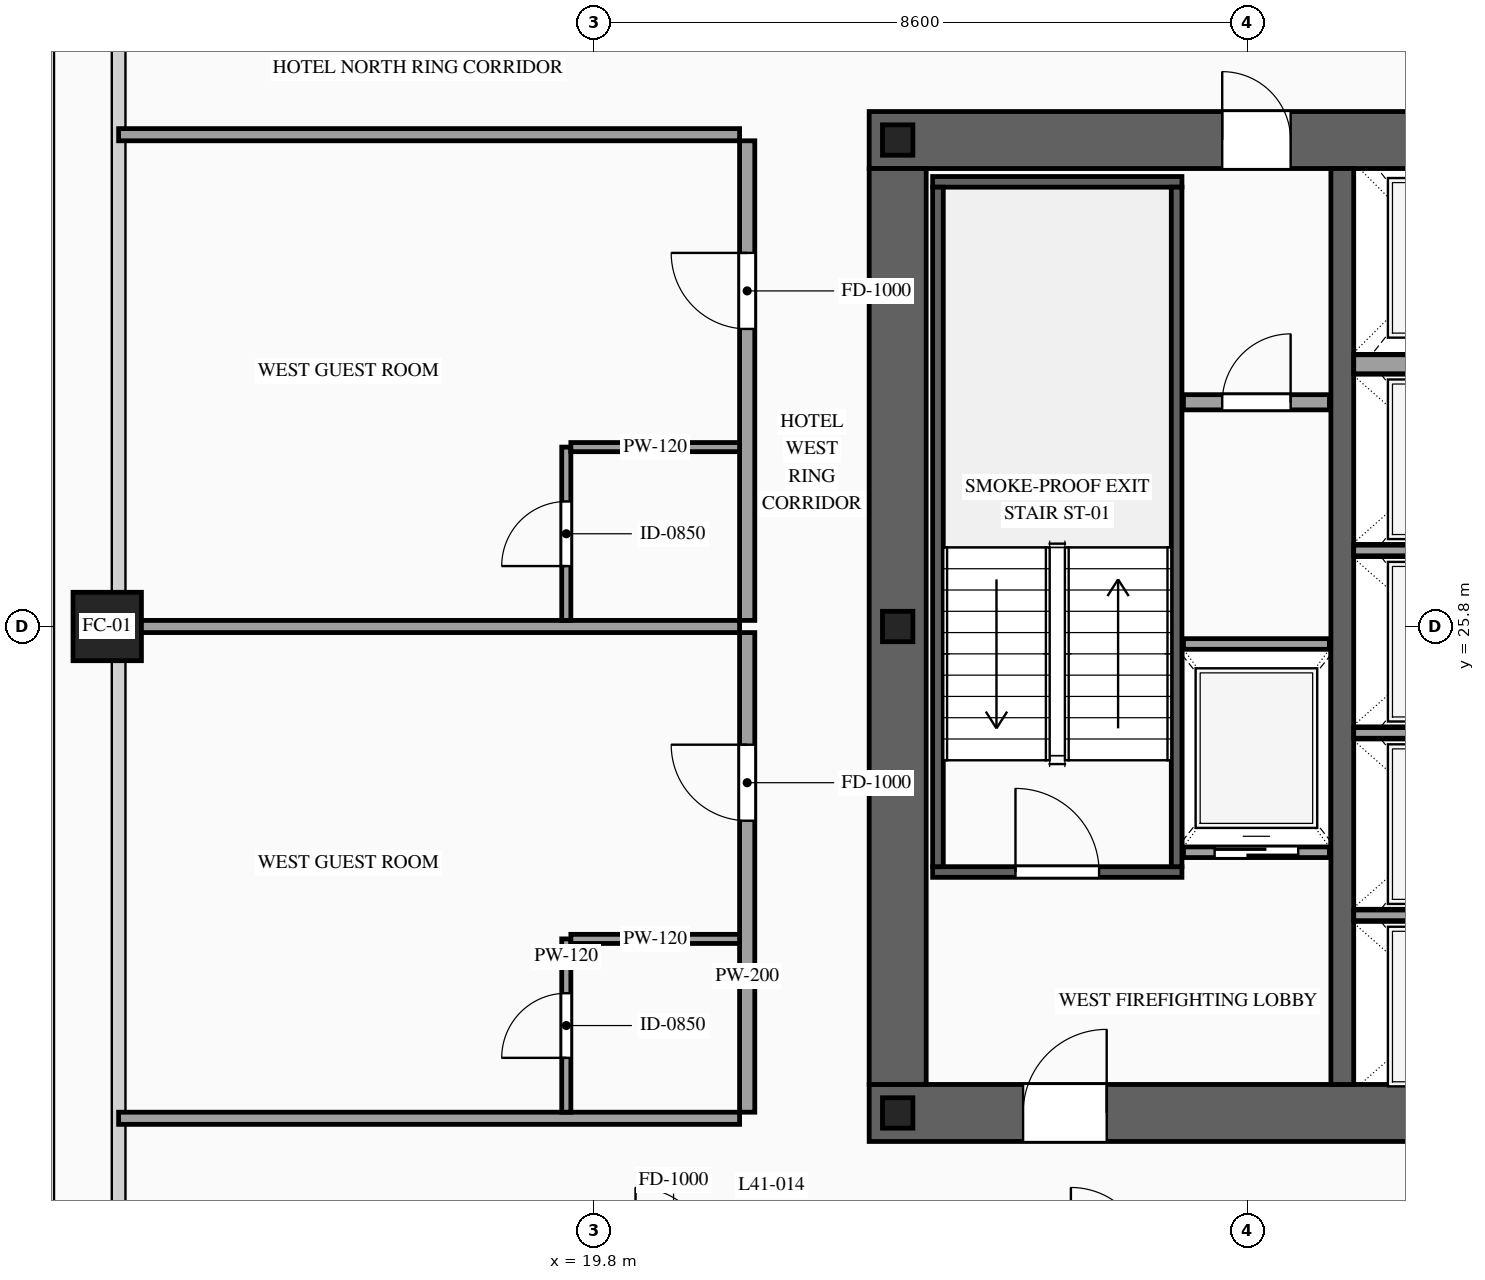
"""IFC4 building model, lengths in metres.
Left out: names, types, materials, properties, quantities, classifications, styles, units other than length and angle.
Written with IfcOpenShell. Run it as: python <this file> out.ifc"""

import sys

from ifc_helpers import new_model, si_unit, direction, frame, frame_2d, origin, origin_2d, place, context, subcontext, project, spatial, rectangle, hollow_rectangle, i_section, extrude, source, transform, mapped, element, fill, save


model = new_model("IFC4")
c1 = context("Model", 3, precision=1e-05, world=origin(), true_north=direction((0.0, 1.0)))
c2 = subcontext(c1, "Body", "Model", "MODEL_VIEW")
j1 = project(units=[si_unit("LENGTHUNIT", "METRE"), si_unit("PLANEANGLEUNIT", "RADIAN")], contexts=[c1])
p1 = place(None, origin())
s1 = spatial("IfcSite", under=j1, at=p1, CompositionType="ELEMENT")
p2 = place(p1, origin())
s2 = spatial("IfcBuilding", under=s1, at=p2, CompositionType="ELEMENT")
p3 = place(p2, frame((0.0, 0.0, 156.0)))
s3 = spatial("IfcBuildingStorey", under=s2, at=p3, CompositionType="ELEMENT", Elevation=156.0)
p4 = place(p3, frame((23.425, 19.4, 0.0), z_axis=(0.0, 0.0, 1.0), x_axis=(1.0, 0.0, 0.0)))
e1 = element("IfcWall", 1, at=p4, inside=s3, PredefinedType="SHEAR", context=c2, shape_type="SweptSolid", body=[
    extrude(rectangle(XDim=27.15, YDim=0.75, at=frame_2d((13.575, 0.0))), origin(), (0.0, 0.0, 1.0), 3.6),
])
p5 = place(p4, frame((2.025, 0.0, 0.0)))
e2 = element("IfcOpeningElement", 2, at=p5, cuts=e1, PredefinedType="OPENING", context=c2, shape_type="SweptSolid", body=[
    extrude(rectangle(XDim=1.1, YDim=2.2, at=frame_2d((0.55, 1.1))), frame((0.0, 0.39, 0.0), z_axis=(0.0, -1.0, 0.0), x_axis=(1.0, 0.0, 0.0)), (0.0, 0.0, 1.0), 0.78),
])
p6 = place(p4, frame((9.925, 0.0, 0.0)))
e3 = element("IfcOpeningElement", 3, at=p6, cuts=e1, PredefinedType="OPENING", context=c2, shape_type="SweptSolid", body=[
    extrude(rectangle(XDim=1.1, YDim=2.2, at=frame_2d((0.55, 1.1))), frame((0.0, 0.39, 0.0), z_axis=(0.0, -1.0, 0.0), x_axis=(1.0, 0.0, 0.0)), (0.0, 0.0, 1.0), 0.78),
])
p7 = place(p4, frame((23.125, 0.0, 0.0)))
e4 = element("IfcOpeningElement", 4, at=p7, cuts=e1, PredefinedType="OPENING", context=c2, shape_type="SweptSolid", body=[
    extrude(rectangle(XDim=1.1, YDim=2.2, at=frame_2d((0.55, 1.1))), frame((0.0, 0.39, 0.0), z_axis=(0.0, -1.0, 0.0), x_axis=(1.0, 0.0, 0.0)), (0.0, 0.0, 1.0), 0.78),
])
p8 = place(p4, frame((19.745, 0.0, 0.0)))
e5 = element("IfcOpeningElement", 5, at=p8, cuts=e1, PredefinedType="OPENING", context=c2, shape_type="SweptSolid", body=[
    extrude(rectangle(XDim=0.9, YDim=2.15, at=frame_2d((0.45, 1.075))), frame((0.0, 0.39, 0.0), z_axis=(0.0, -1.0, 0.0), x_axis=(1.0, 0.0, 0.0)), (0.0, 0.0, 1.0), 0.78),
])
p9 = place(p4, frame((18.305, 0.0, 0.0)))
e6 = element("IfcOpeningElement", 6, at=p9, cuts=e1, PredefinedType="OPENING", context=c2, shape_type="SweptSolid", body=[
    extrude(rectangle(XDim=0.9, YDim=2.15, at=frame_2d((0.45, 1.075))), frame((0.0, 0.39, 0.0), z_axis=(0.0, -1.0, 0.0), x_axis=(1.0, 0.0, 0.0)), (0.0, 0.0, 1.0), 0.78),
])
p10 = place(p3, frame((23.425, 32.2, 0.0), z_axis=(0.0, 0.0, 1.0), x_axis=(1.0, 0.0, 0.0)))
e7 = element("IfcWall", 7, at=p10, inside=s3, PredefinedType="SHEAR", context=c2, shape_type="SweptSolid", body=[
    extrude(rectangle(XDim=27.15, YDim=0.75, at=frame_2d((13.575, 0.0))), origin(), (0.0, 0.0, 1.0), 3.6),
])
p11 = place(p10, frame((4.645, 0.0, 0.0)))
e8 = element("IfcOpeningElement", 8, at=p11, cuts=e7, PredefinedType="OPENING", context=c2, shape_type="SweptSolid", body=[
    extrude(rectangle(XDim=0.9, YDim=2.15, at=frame_2d((0.45, 1.075))), frame((0.0, 0.39, 0.0), z_axis=(0.0, -1.0, 0.0), x_axis=(1.0, 0.0, 0.0)), (0.0, 0.0, 1.0), 0.78),
])
p12 = place(p10, frame((9.925, 0.0, 0.0)))
e9 = element("IfcOpeningElement", 9, at=p12, cuts=e7, PredefinedType="OPENING", context=c2, shape_type="SweptSolid", body=[
    extrude(rectangle(XDim=1.1, YDim=2.2, at=frame_2d((0.55, 1.1))), frame((0.0, 0.39, 0.0), z_axis=(0.0, -1.0, 0.0), x_axis=(1.0, 0.0, 0.0)), (0.0, 0.0, 1.0), 0.78),
])
p13 = place(p10, frame((15.775, 0.0, 0.0)))
e10 = element("IfcOpeningElement", 10, at=p13, cuts=e7, PredefinedType="OPENING", context=c2, shape_type="SweptSolid", body=[
    extrude(rectangle(XDim=1.1, YDim=2.2, at=frame_2d((0.55, 1.1))), frame((0.0, 0.39, 0.0), z_axis=(0.0, -1.0, 0.0), x_axis=(1.0, 0.0, 0.0)), (0.0, 0.0, 1.0), 0.78),
])
p14 = place(p10, frame((18.305, 0.0, 0.0)))
e11 = element("IfcOpeningElement", 11, at=p14, cuts=e7, PredefinedType="OPENING", context=c2, shape_type="SweptSolid", body=[
    extrude(rectangle(XDim=0.9, YDim=2.15, at=frame_2d((0.45, 1.075))), frame((0.0, 0.39, 0.0), z_axis=(0.0, -1.0, 0.0), x_axis=(1.0, 0.0, 0.0)), (0.0, 0.0, 1.0), 0.78),
])
p15 = place(p10, frame((19.745, 0.0, 0.0)))
e12 = element("IfcOpeningElement", 12, at=p15, cuts=e7, PredefinedType="OPENING", context=c2, shape_type="SweptSolid", body=[
    extrude(rectangle(XDim=0.9, YDim=2.15, at=frame_2d((0.45, 1.075))), frame((0.0, 0.39, 0.0), z_axis=(0.0, -1.0, 0.0), x_axis=(1.0, 0.0, 0.0)), (0.0, 0.0, 1.0), 0.78),
])
m1 = source(origin(), c2, "Body", "SweptSolid", [
    extrude(rectangle(XDim=12.05, YDim=0.75, at=frame_2d((6.025, 0.0))), origin(), (0.0, 0.0, 1.0), 3.6),
])
p16 = place(p3, frame((23.8, 19.775, 0.0), z_axis=(0.0, 0.0, 1.0), x_axis=(0.0, 1.0, 0.0)))
e13 = element("IfcWall", 13, at=p16, inside=s3, PredefinedType="SHEAR", context=c2, shape_type="MappedRepresentation", body=[
    mapped(m1, transform((0.0, 0.0, 0.0), scale=1.0)),
])
m2 = source(origin(), c2, "Body", "SweptSolid", [
    extrude(rectangle(XDim=12.05, YDim=0.3, at=frame_2d((6.025, 0.0))), origin(), (0.0, 0.0, 1.0), 3.6),
])
p17 = place(p3, frame((29.65, 19.775, 0.0), z_axis=(0.0, 0.0, 1.0), x_axis=(0.0, 1.0, 0.0)))
e14 = element("IfcWall", 14, at=p17, inside=s3, PredefinedType="SOLIDWALL", context=c2, shape_type="MappedRepresentation", body=[
    mapped(m2, transform((0.0, 0.0, 0.0), scale=1.0)),
])
m3 = source(origin(), c2, "Body", "SweptSolid", [
    extrude(i_section(OverallWidth=0.4, OverallDepth=0.4, WebThickness=0.013, FlangeThickness=0.021, at=origin_2d()), origin(), (0.0, 0.0, 1.0), 3.6),
])
for number, where, z_axis, x_axis in (
    (15, (23.8, 19.4, 0.0), (0.0, 0.0, 1.0), (1.0, 0.0, 0.0)),
    (16, (23.8, 25.8, 0.0), (0.0, 0.0, 1.0), (1.0, 0.0, 0.0)),
    (17, (23.8, 32.2, 0.0), (0.0, 0.0, 1.0), (1.0, 0.0, 0.0)),
):
    element("IfcColumn", number, at=place(p3, frame(where, z_axis=z_axis, x_axis=x_axis)), inside=s3, PredefinedType="COLUMN", context=c2, shape_type="MappedRepresentation", body=[
        mapped(m3, transform((0.0, 0.0, 0.0), scale=1.0)),
    ])
m4 = source(origin(), c2, "Body", "SweptSolid", [
    extrude(hollow_rectangle(XDim=0.9, YDim=0.9, WallThickness=0.042, at=origin_2d()), origin(), (0.0, 0.0, 1.0), 3.6),
])
p18 = place(p3, frame((13.4, 25.8, 0.0), z_axis=(0.0, 0.0, 1.0), x_axis=(1.0, 0.0, 0.0)))
e18 = element("IfcColumn", 18, at=p18, inside=s3, PredefinedType="COLUMN", context=c2, shape_type="MappedRepresentation", body=[
    mapped(m4, transform((0.0, 0.0, 0.0), scale=1.0)),
])
p19 = place(p3, frame((27.56, 22.83, 0.0), z_axis=(0.0, 0.0, 1.0), x_axis=(1.0, 0.0, 0.0)))
e19 = element("IfcWall", 19, at=p19, inside=s3, PredefinedType="SOLIDWALL", context=c2, shape_type="SweptSolid", body=[
    extrude(rectangle(XDim=1.92, YDim=0.14, at=frame_2d((0.96, 0.0))), origin(), (0.0, 0.0, 1.0), 3.38),
])
p20 = place(p19, frame((0.41, 0.0, 0.0)))
e20 = element("IfcOpeningElement", 20, at=p20, cuts=e19, PredefinedType="OPENING", context=c2, shape_type="SweptSolid", body=[
    extrude(rectangle(XDim=1.1, YDim=2.2, at=frame_2d((0.55, 1.1))), frame((0.0, 0.085, 0.0), z_axis=(0.0, -1.0, 0.0), x_axis=(1.0, 0.0, 0.0)), (0.0, 0.0, 1.0), 0.17),
])
m5 = source(origin(), c2, "Body", "SweptSolid", [
    extrude(rectangle(XDim=1.92, YDim=0.14, at=frame_2d((0.96, 0.0))), origin(), (0.0, 0.0, 1.0), 3.38),
])
p21 = place(p3, frame((27.56, 25.57, 0.0), z_axis=(0.0, 0.0, 1.0), x_axis=(1.0, 0.0, 0.0)))
e21 = element("IfcWall", 21, at=p21, inside=s3, PredefinedType="SOLIDWALL", context=c2, shape_type="MappedRepresentation", body=[
    mapped(m5, transform((0.0, 0.0, 0.0), scale=1.0)),
])
m6 = source(origin(), c2, "Body", "SweptSolid", [
    extrude(rectangle(XDim=2.5, YDim=0.14, at=frame_2d((1.25, 0.0))), origin(), (0.0, 0.0, 1.0), 3.38),
])
for number, where, z_axis, x_axis in (
    (22, (29.8, 22.0, 0.0), (0.0, 0.0, 1.0), (1.0, 0.0, 0.0)),
    (23, (29.8, 24.4, 0.0), (0.0, 0.0, 1.0), (1.0, 0.0, 0.0)),
    (24, (29.8, 26.8, 0.0), (0.0, 0.0, 1.0), (1.0, 0.0, 0.0)),
):
    element("IfcWall", number, at=place(p3, frame(where, z_axis=z_axis, x_axis=x_axis)), inside=s3, PredefinedType="SOLIDWALL", context=c2, shape_type="MappedRepresentation", body=[
        mapped(m6, transform((0.0, 0.0, 0.0), scale=1.0)),
    ])
m7 = source(origin(), c2, "Body", "SweptSolid", [
    extrude(rectangle(XDim=2.5, YDim=0.25, at=frame_2d((1.25, 0.0))), origin(), (0.0, 0.0, 1.0), 3.38),
])
p22 = place(p3, frame((29.8, 29.25, 0.0), z_axis=(0.0, 0.0, 1.0), x_axis=(1.0, 0.0, 0.0)))
e25 = element("IfcWall", 25, at=p22, inside=s3, PredefinedType="SOLIDWALL", context=c2, shape_type="MappedRepresentation", body=[
    mapped(m7, transform((0.0, 0.0, 0.0), scale=1.0)),
])
p23 = place(p3, frame((24.26, 22.57, 0.0), z_axis=(0.0, 0.0, 1.0), x_axis=(1.0, 0.0, 0.0)))
e26 = element("IfcWall", 26, at=p23, inside=s3, PredefinedType="SOLIDWALL", context=c2, shape_type="SweptSolid", body=[
    extrude(rectangle(XDim=3.28, YDim=0.14, at=frame_2d((1.64, 0.0))), origin(), (0.0, 0.0, 1.0), 3.38),
])
p24 = place(p23, frame((1.09, 0.0, 0.0)))
e27 = element("IfcOpeningElement", 27, at=p24, cuts=e26, PredefinedType="OPENING", context=c2, shape_type="SweptSolid", body=[
    extrude(rectangle(XDim=1.1, YDim=2.2, at=frame_2d((0.55, 1.1))), frame((0.0, 0.085, 0.0), z_axis=(0.0, -1.0, 0.0), x_axis=(1.0, 0.0, 0.0)), (0.0, 0.0, 1.0), 0.17),
])
m8 = source(origin(), c2, "Body", "SweptSolid", [
    extrude(rectangle(XDim=3.28, YDim=0.14, at=frame_2d((1.64, 0.0))), origin(), (0.0, 0.0, 1.0), 3.38),
])
p25 = place(p3, frame((24.26, 31.65, 0.0), z_axis=(0.0, 0.0, 1.0), x_axis=(1.0, 0.0, 0.0)))
e28 = element("IfcWall", 28, at=p25, inside=s3, PredefinedType="SOLIDWALL", context=c2, shape_type="MappedRepresentation", body=[
    mapped(m8, transform((0.0, 0.0, 0.0), scale=1.0)),
])
m9 = source(origin(), c2, "Body", "SweptSolid", [
    extrude(rectangle(XDim=8.94, YDim=0.14, at=frame_2d((4.47, 0.0))), origin(), (0.0, 0.0, 1.0), 3.38),
])
for number, where, z_axis, x_axis in (
    (29, (24.33, 22.64, 0.0), (0.0, 0.0, 1.0), (0.0, 1.0, 0.0)),
    (30, (27.47, 22.64, 0.0), (0.0, 0.0, 1.0), (0.0, 1.0, 0.0)),
):
    element("IfcWall", number, at=place(p3, frame(where, z_axis=z_axis, x_axis=x_axis)), inside=s3, PredefinedType="SOLIDWALL", context=c2, shape_type="MappedRepresentation", body=[
        mapped(m9, transform((0.0, 0.0, 0.0), scale=1.0)),
    ])
p26 = place(p3, frame((27.56, 28.75, 0.0), z_axis=(0.0, 0.0, 1.0), x_axis=(1.0, 0.0, 0.0)))
e31 = element("IfcWall", 31, at=p26, inside=s3, PredefinedType="PARTITIONING", context=c2, shape_type="SweptSolid", body=[
    extrude(rectangle(XDim=1.92, YDim=0.2, at=frame_2d((0.96, 0.0))), origin(), (0.0, 0.0, 1.0), 3.38),
])
p27 = place(p26, frame((0.51, 0.0, 0.0)))
e32 = element("IfcOpeningElement", 32, at=p27, cuts=e31, PredefinedType="OPENING", context=c2, shape_type="SweptSolid", body=[
    extrude(rectangle(XDim=0.9, YDim=2.15, at=frame_2d((0.45, 1.075))), frame((0.0, 0.115, 0.0), z_axis=(0.0, -1.0, 0.0), x_axis=(1.0, 0.0, 0.0)), (0.0, 0.0, 1.0), 0.23),
])
p28 = place(p3, frame((21.82, 19.41, 0.0), z_axis=(0.0, 0.0, 1.0), x_axis=(0.0, 1.0, 0.0)))
e33 = element("IfcWall", 33, at=p28, inside=s3, PredefinedType="PARTITIONING", context=c2, shape_type="SweptSolid", body=[
    extrude(rectangle(XDim=6.31, YDim=0.2, at=frame_2d((3.155, 0.0))), origin(), (0.0, 0.0, 1.0), 3.38),
])
p29 = place(p28, frame((3.835, 0.0, 0.0)))
e34 = element("IfcOpeningElement", 34, at=p29, cuts=e33, PredefinedType="OPENING", context=c2, shape_type="SweptSolid", body=[
    extrude(rectangle(XDim=1.0, YDim=2.2, at=frame_2d((0.5, 1.1))), frame((0.0, 0.115, 0.0), z_axis=(0.0, -1.0, 0.0), x_axis=(1.0, 0.0, 0.0)), (0.0, 0.0, 1.0), 0.23),
])
m10 = source(origin(), c2, "Body", "SweptSolid", [
    extrude(rectangle(XDim=8.17, YDim=0.16, at=frame_2d((4.085, 0.0))), origin(), (0.0, 0.0, 1.0), 2.675),
])
p30 = place(p3, frame((13.55, 25.8, 0.0), z_axis=(0.0, 0.0, 1.0), x_axis=(1.0, 0.0, 0.0)))
e35 = element("IfcWall", 35, at=p30, inside=s3, PredefinedType="PARTITIONING", context=c2, shape_type="MappedRepresentation", body=[
    mapped(m10, transform((0.0, 0.0, 0.0), scale=1.0)),
])
m11 = source(origin(), c2, "Body", "SweptSolid", [
    extrude(rectangle(XDim=8.17, YDim=0.16, at=frame_2d((4.085, 0.0))), origin(), (0.0, 0.0, 1.0), 2.875),
])
p31 = place(p3, frame((13.55, 19.33, 0.0), z_axis=(0.0, 0.0, 1.0), x_axis=(1.0, 0.0, 0.0)))
e36 = element("IfcWall", 36, at=p31, inside=s3, PredefinedType="PARTITIONING", context=c2, shape_type="MappedRepresentation", body=[
    mapped(m11, transform((0.0, 0.0, 0.0), scale=1.0)),
])
p32 = place(p3, frame((19.44, 19.41, 0.0), z_axis=(0.0, 0.0, 1.0), x_axis=(0.0, 1.0, 0.0)))
e37 = element("IfcWall", 37, at=p32, inside=s3, PredefinedType="PARTITIONING", context=c2, shape_type="SweptSolid", body=[
    extrude(rectangle(XDim=2.28, YDim=0.12, at=frame_2d((1.14, 0.0))), origin(), (0.0, 0.0, 1.0), 3.38),
])
p33 = place(p32, frame((0.715, 0.0, 0.0)))
e38 = element("IfcOpeningElement", 38, at=p33, cuts=e37, PredefinedType="OPENING", context=c2, shape_type="SweptSolid", body=[
    extrude(rectangle(XDim=0.85, YDim=2.1, at=frame_2d((0.425, 1.05))), frame((0.0, 0.075, 0.0), z_axis=(0.0, -1.0, 0.0), x_axis=(1.0, 0.0, 0.0)), (0.0, 0.0, 1.0), 0.15),
])
m12 = source(origin(), c2, "Body", "SweptSolid", [
    extrude(rectangle(XDim=2.22, YDim=0.12, at=frame_2d((1.11, 0.0))), origin(), (0.0, 0.0, 1.0), 3.38),
])
p34 = place(p3, frame((19.5, 21.69, 0.0), z_axis=(0.0, 0.0, 1.0), x_axis=(1.0, 0.0, 0.0)))
e39 = element("IfcWall", 39, at=p34, inside=s3, PredefinedType="PARTITIONING", context=c2, shape_type="MappedRepresentation", body=[
    mapped(m12, transform((0.0, 0.0, 0.0), scale=1.0)),
])
p35 = place(p3, frame((21.82, 25.88, 0.0), z_axis=(0.0, 0.0, 1.0), x_axis=(0.0, 1.0, 0.0)))
e40 = element("IfcWall", 40, at=p35, inside=s3, PredefinedType="PARTITIONING", context=c2, shape_type="SweptSolid", body=[
    extrude(rectangle(XDim=6.31, YDim=0.2, at=frame_2d((3.155, 0.0))), origin(), (0.0, 0.0, 1.0), 3.38),
])
p36 = place(p35, frame((3.835, 0.0, 0.0)))
e41 = element("IfcOpeningElement", 41, at=p36, cuts=e40, PredefinedType="OPENING", context=c2, shape_type="SweptSolid", body=[
    extrude(rectangle(XDim=1.0, YDim=2.2, at=frame_2d((0.5, 1.1))), frame((0.0, 0.115, 0.0), z_axis=(0.0, -1.0, 0.0), x_axis=(1.0, 0.0, 0.0)), (0.0, 0.0, 1.0), 0.23),
])
p37 = place(p3, frame((13.55, 32.27, 0.0), z_axis=(0.0, 0.0, 1.0), x_axis=(1.0, 0.0, 0.0)))
e42 = element("IfcWall", 42, at=p37, inside=s3, PredefinedType="PARTITIONING", context=c2, shape_type="MappedRepresentation", body=[
    mapped(m11, transform((0.0, 0.0, 0.0), scale=1.0)),
])
p38 = place(p3, frame((19.44, 25.88, 0.0), z_axis=(0.0, 0.0, 1.0), x_axis=(0.0, 1.0, 0.0)))
e43 = element("IfcWall", 43, at=p38, inside=s3, PredefinedType="PARTITIONING", context=c2, shape_type="SweptSolid", body=[
    extrude(rectangle(XDim=2.28, YDim=0.12, at=frame_2d((1.14, 0.0))), origin(), (0.0, 0.0, 1.0), 3.38),
])
p39 = place(p38, frame((0.715, 0.0, 0.0)))
e44 = element("IfcOpeningElement", 44, at=p39, cuts=e43, PredefinedType="OPENING", context=c2, shape_type="SweptSolid", body=[
    extrude(rectangle(XDim=0.85, YDim=2.1, at=frame_2d((0.425, 1.05))), frame((0.0, 0.075, 0.0), z_axis=(0.0, -1.0, 0.0), x_axis=(1.0, 0.0, 0.0)), (0.0, 0.0, 1.0), 0.15),
])
p40 = place(p3, frame((19.5, 28.16, 0.0), z_axis=(0.0, 0.0, 1.0), x_axis=(1.0, 0.0, 0.0)))
e45 = element("IfcWall", 45, at=p40, inside=s3, PredefinedType="PARTITIONING", context=c2, shape_type="MappedRepresentation", body=[
    mapped(m12, transform((0.0, 0.0, 0.0), scale=1.0)),
])
m13 = source(origin(), c2, "Body", "SweptSolid", [
    extrude(rectangle(XDim=1.1, YDim=2.2, at=frame_2d((0.55, 1.1))), frame((0.0, 0.025, 0.0), z_axis=(0.0, -1.0, 0.0), x_axis=(1.0, 0.0, 0.0)), (0.0, 0.0, 1.0), 0.05),
])
p41 = place(p20, origin())
e46 = element("IfcDoor", 46, at=p41, inside=s3, OperationType="SLIDING_TO_LEFT", PredefinedType="DOOR", context=c2, shape_type="MappedRepresentation", body=[
    mapped(m13, transform((0.0, 0.0, 0.0), scale=1.0)),
])
fill(e20, e46)
m14 = source(origin(), c2, "Body", "SweptSolid", [
    extrude(rectangle(XDim=1.1, YDim=2.2, at=frame_2d((0.55, 1.1))), frame((0.0, 0.025, 0.0), z_axis=(0.0, -1.0, 0.0), x_axis=(1.0, 0.0, 0.0)), (0.0, 0.0, 1.0), 0.05),
])
p42 = place(p24, origin())
e47 = element("IfcDoor", 47, at=p42, inside=s3, OperationType="SINGLE_SWING_LEFT", PredefinedType="DOOR", context=c2, shape_type="MappedRepresentation", body=[
    mapped(m14, transform((0.0, 0.0, 0.0), scale=1.0)),
])
fill(e27, e47)
p43 = place(p5, origin())
e48 = element("IfcDoor", 48, at=p43, inside=s3, OperationType="SINGLE_SWING_RIGHT", PredefinedType="DOOR", context=c2, shape_type="MappedRepresentation", body=[
    mapped(m14, transform((0.0, 0.0, 0.0), scale=1.0)),
])
fill(e2, e48)
m15 = source(origin(), c2, "Body", "SweptSolid", [
    extrude(rectangle(XDim=0.9, YDim=2.15, at=frame_2d((0.45, 1.075))), frame((0.0, 0.025, 0.0), z_axis=(0.0, -1.0, 0.0), x_axis=(1.0, 0.0, 0.0)), (0.0, 0.0, 1.0), 0.05),
])
p44 = place(p11, origin())
e49 = element("IfcDoor", 49, at=p44, inside=s3, OperationType="SINGLE_SWING_LEFT", PredefinedType="DOOR", context=c2, shape_type="MappedRepresentation", body=[
    mapped(m15, transform((0.0, 0.0, 0.0), scale=1.0)),
])
fill(e8, e49)
p45 = place(p27, origin())
e50 = element("IfcDoor", 50, at=p45, inside=s3, OperationType="SINGLE_SWING_RIGHT", PredefinedType="DOOR", context=c2, shape_type="MappedRepresentation", body=[
    mapped(m15, transform((0.0, 0.0, 0.0), scale=1.0)),
])
fill(e32, e50)
m16 = source(origin(), c2, "Body", "SweptSolid", [
    extrude(rectangle(XDim=1.0, YDim=2.2, at=frame_2d((0.5, 1.1))), frame((0.0, 0.025, 0.0), z_axis=(0.0, -1.0, 0.0), x_axis=(1.0, 0.0, 0.0)), (0.0, 0.0, 1.0), 0.05),
])
p46 = place(p29, origin())
e51 = element("IfcDoor", 51, at=p46, inside=s3, OperationType="SINGLE_SWING_RIGHT", PredefinedType="DOOR", context=c2, shape_type="MappedRepresentation", body=[
    mapped(m16, transform((0.0, 0.0, 0.0), scale=1.0)),
])
fill(e34, e51)
m17 = source(origin(), c2, "Body", "SweptSolid", [
    extrude(rectangle(XDim=0.85, YDim=2.1, at=frame_2d((0.425, 1.05))), frame((0.0, 0.025, 0.0), z_axis=(0.0, -1.0, 0.0), x_axis=(1.0, 0.0, 0.0)), (0.0, 0.0, 1.0), 0.05),
])
p47 = place(p33, origin())
e52 = element("IfcDoor", 52, at=p47, inside=s3, OperationType="SINGLE_SWING_LEFT", PredefinedType="DOOR", context=c2, shape_type="MappedRepresentation", body=[
    mapped(m17, transform((0.0, 0.0, 0.0), scale=1.0)),
])
fill(e38, e52)
p48 = place(p36, origin())
e53 = element("IfcDoor", 53, at=p48, inside=s3, OperationType="SINGLE_SWING_RIGHT", PredefinedType="DOOR", context=c2, shape_type="MappedRepresentation", body=[
    mapped(m16, transform((0.0, 0.0, 0.0), scale=1.0)),
])
fill(e41, e53)
p49 = place(p39, origin())
e54 = element("IfcDoor", 54, at=p49, inside=s3, OperationType="SINGLE_SWING_LEFT", PredefinedType="DOOR", context=c2, shape_type="MappedRepresentation", body=[
    mapped(m17, transform((0.0, 0.0, 0.0), scale=1.0)),
])
fill(e44, e54)
save(model, sys.argv[1])
